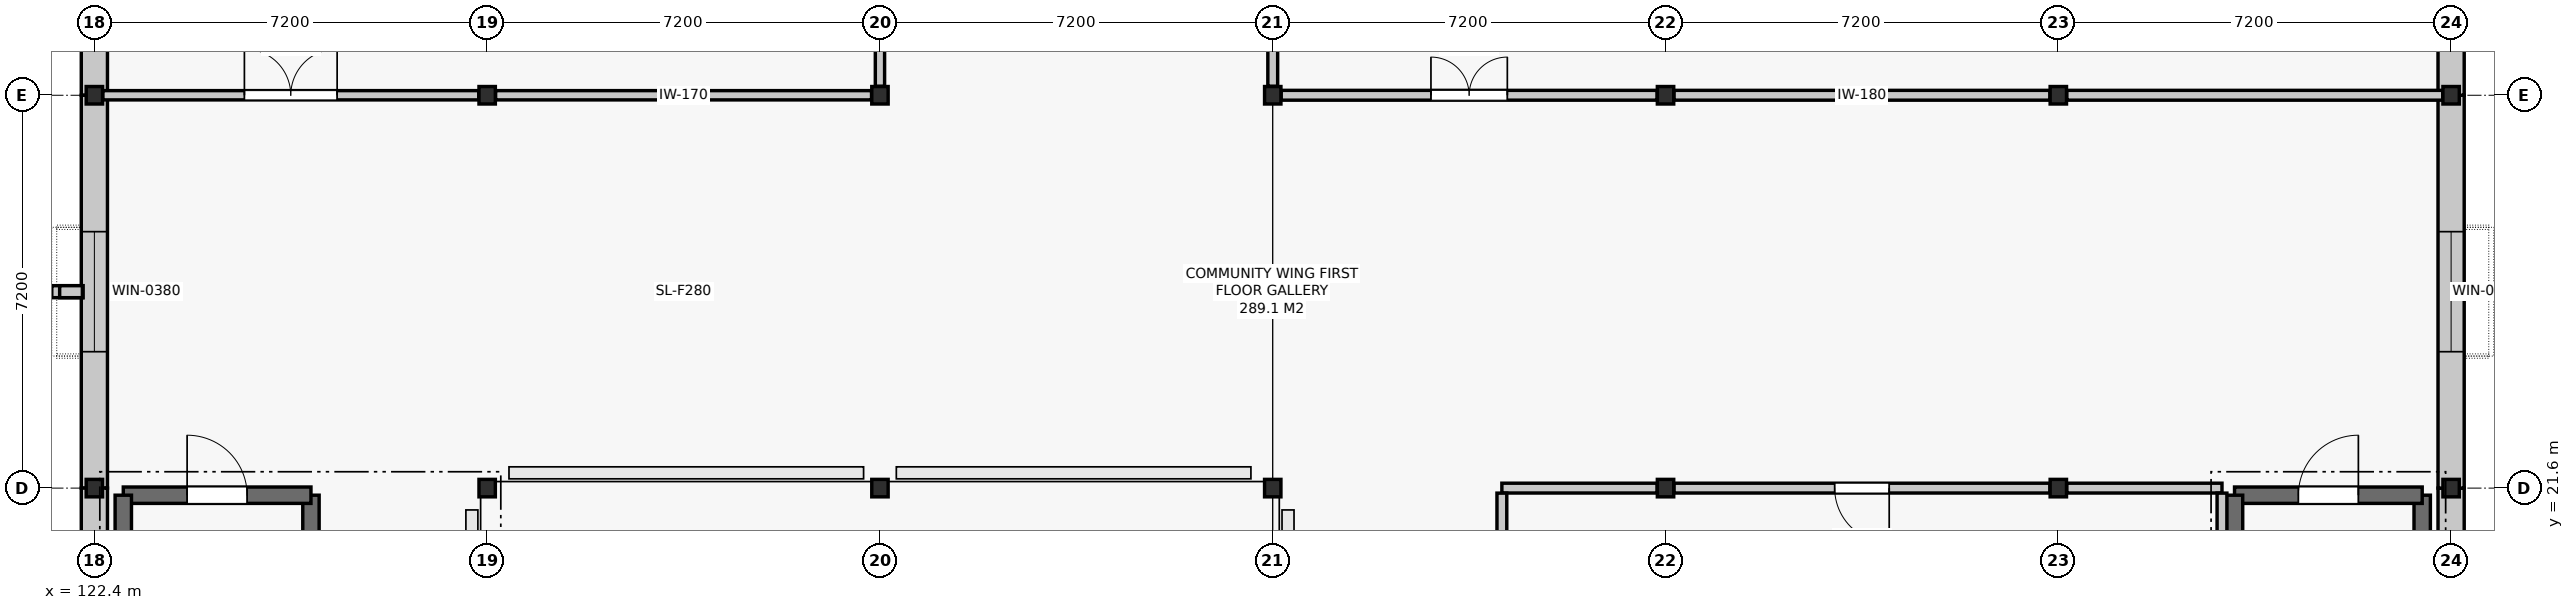
"""IFC4 building model, lengths in metres.
Left out: names, types, materials, properties, quantities, classifications, styles, units other than length and angle.
Written with IfcOpenShell. Run it as: python <this file> out.ifc"""

import sys

from ifc_helpers import new_model, si_unit, direction, frame, frame_2d, origin, origin_2d, place, context, subcontext, project, spatial, rectangle, i_section, extrude, element, fill, save


model = new_model("IFC4")
c1 = context("Model", 3, precision=1e-05, world=origin(), true_north=direction((0.0, 1.0)))
c2 = subcontext(c1, "Body", "Model", "MODEL_VIEW")
j1 = project(units=[si_unit("LENGTHUNIT", "METRE"), si_unit("PLANEANGLEUNIT", "RADIAN")], contexts=[c1])
p1 = place(None, origin())
s1 = spatial("IfcSite", under=j1, at=p1, CompositionType="ELEMENT")
p2 = place(p1, origin())
s2 = spatial("IfcBuilding", under=s1, at=p2, CompositionType="ELEMENT")
p3 = place(p2, frame((0.0, 0.0, 5.4)))
s3 = spatial("IfcBuildingStorey", under=s2, at=p3, CompositionType="ELEMENT", Elevation=5.4)
for number, where, z_axis, x_axis in (
    (1, (122.4, 21.6, 0.0), (0.0, 0.0, 1.0), (1.0, 0.0, 0.0)),
    (2, (122.4, 28.8, 0.0), (0.0, 0.0, 1.0), (1.0, 0.0, 0.0)),
    (3, (129.6, 21.6, 0.0), (0.0, 0.0, 1.0), (1.0, 0.0, 0.0)),
    (4, (129.6, 28.8, 0.0), (0.0, 0.0, 1.0), (1.0, 0.0, 0.0)),
    (5, (136.8, 21.6, 0.0), (0.0, 0.0, 1.0), (1.0, 0.0, 0.0)),
    (6, (136.8, 28.8, 0.0), (0.0, 0.0, 1.0), (1.0, 0.0, 0.0)),
    (7, (144.0, 21.6, 0.0), (0.0, 0.0, 1.0), (1.0, 0.0, 0.0)),
    (8, (144.0, 28.8, 0.0), (0.0, 0.0, 1.0), (1.0, 0.0, 0.0)),
    (9, (151.2, 21.6, 0.0), (0.0, 0.0, 1.0), (1.0, 0.0, 0.0)),
    (10, (151.2, 28.8, 0.0), (0.0, 0.0, 1.0), (1.0, 0.0, 0.0)),
    (11, (158.4, 21.6, 0.0), (0.0, 0.0, 1.0), (1.0, 0.0, 0.0)),
    (12, (158.4, 28.8, 0.0), (0.0, 0.0, 1.0), (1.0, 0.0, 0.0)),
    (13, (165.6, 21.6, 0.0), (0.0, 0.0, 1.0), (1.0, 0.0, 0.0)),
    (14, (165.6, 28.8, 0.0), (0.0, 0.0, 1.0), (1.0, 0.0, 0.0)),
):
    element("IfcColumn", number, at=place(p3, frame(where, z_axis=z_axis, x_axis=x_axis)), inside=s3, PredefinedType="COLUMN", context=c2, shape_type="SweptSolid", body=[
        extrude(i_section(OverallWidth=0.3, OverallDepth=0.32, WebThickness=0.011, FlangeThickness=0.021, FilletRadius=0.027, at=origin_2d()), origin(), (0.0, 0.0, 1.0), 4.8),
    ])
p4 = place(p3, frame((165.6, 14.4, 0.0), z_axis=(0.0, 0.0, 1.0), x_axis=(0.0, 1.0, 0.0)))
e15 = element("IfcWall", 15, at=p4, inside=s3, PredefinedType="SOLIDWALL", context=c2, shape_type="SweptSolid", body=[
    extrude(rectangle(XDim=7.2, YDim=0.48, at=frame_2d((3.6, 0.0))), origin(), (0.0, 0.0, 1.0), 3.8),
])
p5 = place(p3, frame((165.6, 21.6, 0.0), z_axis=(0.0, 0.0, 1.0), x_axis=(0.0, 1.0, 0.0)))
e16 = element("IfcWall", 16, at=p5, inside=s3, PredefinedType="SOLIDWALL", context=c2, shape_type="SweptSolid", body=[
    extrude(rectangle(XDim=7.2, YDim=0.48, at=frame_2d((3.6, 0.0))), origin(), (0.0, 0.0, 1.0), 3.8),
])
p6 = place(p5, frame((2.5, 0.0, 0.9)))
e17 = element("IfcOpeningElement", 17, at=p6, cuts=e16, PredefinedType="OPENING", context=c2, shape_type="SweptSolid", body=[
    extrude(rectangle(XDim=2.2, YDim=2.25, at=frame_2d((1.1, 1.125))), frame((0.0, 0.252, 0.0), z_axis=(0.0, -1.0, 0.0), x_axis=(1.0, 0.0, 0.0)), (0.0, 0.0, 1.0), 0.504),
])
p7 = place(p3, frame((165.6, 28.8, 0.0), z_axis=(0.0, 0.0, 1.0), x_axis=(0.0, 1.0, 0.0)))
e18 = element("IfcWall", 18, at=p7, inside=s3, PredefinedType="SOLIDWALL", context=c2, shape_type="SweptSolid", body=[
    extrude(rectangle(XDim=7.2, YDim=0.48, at=frame_2d((3.6, 0.0))), origin(), (0.0, 0.0, 1.0), 3.8),
])
p8 = place(p7, frame((2.5, 0.0, 0.9)))
e19 = element("IfcOpeningElement", 19, at=p8, cuts=e18, PredefinedType="OPENING", context=c2, shape_type="SweptSolid", body=[
    extrude(rectangle(XDim=2.2, YDim=2.25, at=frame_2d((1.1, 1.125))), frame((0.0, 0.252, 0.0), z_axis=(0.0, -1.0, 0.0), x_axis=(1.0, 0.0, 0.0)), (0.0, 0.0, 1.0), 0.504),
])
p9 = place(p3, frame((122.4, 36.0, 0.0), z_axis=(0.0, 0.0, 1.0), x_axis=(0.0, -1.0, 0.0)))
e20 = element("IfcWall", 20, at=p9, inside=s3, PredefinedType="SOLIDWALL", context=c2, shape_type="SweptSolid", body=[
    extrude(rectangle(XDim=7.2, YDim=0.48, at=frame_2d((3.6, 0.0))), origin(), (0.0, 0.0, 1.0), 3.8),
])
p10 = place(p9, frame((2.5, 0.0, 0.9)))
e21 = element("IfcOpeningElement", 21, at=p10, cuts=e20, PredefinedType="OPENING", context=c2, shape_type="SweptSolid", body=[
    extrude(rectangle(XDim=2.2, YDim=2.25, at=frame_2d((1.1, 1.125))), frame((0.0, 0.252, 0.0), z_axis=(0.0, -1.0, 0.0), x_axis=(1.0, 0.0, 0.0)), (0.0, 0.0, 1.0), 0.504),
])
p11 = place(p3, frame((122.4, 28.8, 0.0), z_axis=(0.0, 0.0, 1.0), x_axis=(0.0, -1.0, 0.0)))
e22 = element("IfcWall", 22, at=p11, inside=s3, PredefinedType="SOLIDWALL", context=c2, shape_type="SweptSolid", body=[
    extrude(rectangle(XDim=7.2, YDim=0.48, at=frame_2d((3.6, 0.0))), origin(), (0.0, 0.0, 1.0), 3.8),
])
p12 = place(p11, frame((2.5, 0.0, 0.9)))
e23 = element("IfcOpeningElement", 23, at=p12, cuts=e22, PredefinedType="OPENING", context=c2, shape_type="SweptSolid", body=[
    extrude(rectangle(XDim=2.2, YDim=2.25, at=frame_2d((1.1, 1.125))), frame((0.0, 0.252, 0.0), z_axis=(0.0, -1.0, 0.0), x_axis=(1.0, 0.0, 0.0)), (0.0, 0.0, 1.0), 0.504),
])
p13 = place(p3, frame((122.4, 21.6, 0.0), z_axis=(0.0, 0.0, 1.0), x_axis=(0.0, -1.0, 0.0)))
e24 = element("IfcWall", 24, at=p13, inside=s3, PredefinedType="SOLIDWALL", context=c2, shape_type="SweptSolid", body=[
    extrude(rectangle(XDim=7.2, YDim=0.48, at=frame_2d((3.6, 0.0))), origin(), (0.0, 0.0, 1.0), 3.8),
])
p14 = place(p13, frame((2.5, 0.0, 0.9)))
e25 = element("IfcOpeningElement", 25, at=p14, cuts=e24, PredefinedType="OPENING", context=c2, shape_type="SweptSolid", body=[
    extrude(rectangle(XDim=2.2, YDim=2.25, at=frame_2d((1.1, 1.125))), frame((0.0, 0.252, 0.0), z_axis=(0.0, -1.0, 0.0), x_axis=(1.0, 0.0, 0.0)), (0.0, 0.0, 1.0), 0.504),
])
p15 = place(p3, frame((126.37, 14.43, 0.0), z_axis=(0.0, 0.0, 1.0), x_axis=(0.0, 1.0, 0.0)))
e26 = element("IfcWall", 26, at=p15, inside=s3, PredefinedType="SHEAR", context=c2, shape_type="SweptSolid", body=[
    extrude(rectangle(XDim=7.04, YDim=0.3, at=frame_2d((3.52, 0.0))), origin(), (0.0, 0.0, 1.0), 4.52),
])
p16 = place(p3, frame((126.37, 21.47, 0.0), z_axis=(0.0, 0.0, 1.0), x_axis=(-1.0, 0.0, 0.0)))
e27 = element("IfcWall", 27, at=p16, inside=s3, PredefinedType="SHEAR", context=c2, shape_type="SweptSolid", body=[
    extrude(rectangle(XDim=3.44, YDim=0.3, at=frame_2d((1.72, 0.0))), origin(), (0.0, 0.0, 1.0), 4.52),
])
p17 = place(p16, frame((1.17, 0.0, 0.0)))
e28 = element("IfcOpeningElement", 28, at=p17, cuts=e27, PredefinedType="OPENING", context=c2, shape_type="SweptSolid", body=[
    extrude(rectangle(XDim=1.1, YDim=2.15, at=frame_2d((0.55, 1.075))), frame((0.0, 0.162, 0.0), z_axis=(0.0, -1.0, 0.0), x_axis=(1.0, 0.0, 0.0)), (0.0, 0.0, 1.0), 0.324),
])
for number, where, z_axis, x_axis in (
    (29, (122.93, 21.47, 0.0), (0.0, 0.0, 1.0), (0.0, -1.0, 0.0)),
    (30, (165.07, 14.43, 0.0), (0.0, 0.0, 1.0), (0.0, 1.0, 0.0)),
):
    element("IfcWall", number, at=place(p3, frame(where, z_axis=z_axis, x_axis=x_axis)), inside=s3, PredefinedType="SHEAR", context=c2, shape_type="SweptSolid", body=[
        extrude(rectangle(XDim=7.04, YDim=0.3, at=frame_2d((3.52, 0.0))), origin(), (0.0, 0.0, 1.0), 4.52),
    ])
p18 = place(p3, frame((165.07, 21.47, 0.0), z_axis=(0.0, 0.0, 1.0), x_axis=(-1.0, 0.0, 0.0)))
e31 = element("IfcWall", 31, at=p18, inside=s3, PredefinedType="SHEAR", context=c2, shape_type="SweptSolid", body=[
    extrude(rectangle(XDim=3.44, YDim=0.3, at=frame_2d((1.72, 0.0))), origin(), (0.0, 0.0, 1.0), 4.52),
])
p19 = place(p18, frame((1.17, 0.0, 0.0)))
e32 = element("IfcOpeningElement", 32, at=p19, cuts=e31, PredefinedType="OPENING", context=c2, shape_type="SweptSolid", body=[
    extrude(rectangle(XDim=1.1, YDim=2.15, at=frame_2d((0.55, 1.075))), frame((0.0, 0.162, 0.0), z_axis=(0.0, -1.0, 0.0), x_axis=(1.0, 0.0, 0.0)), (0.0, 0.0, 1.0), 0.324),
])
p20 = place(p3, frame((161.63, 21.47, 0.0), z_axis=(0.0, 0.0, 1.0), x_axis=(0.0, -1.0, 0.0)))
e33 = element("IfcWall", 33, at=p20, inside=s3, PredefinedType="SHEAR", context=c2, shape_type="SweptSolid", body=[
    extrude(rectangle(XDim=7.04, YDim=0.3, at=frame_2d((3.52, 0.0))), origin(), (0.0, 0.0, 1.0), 4.52),
])
p21 = place(p3, frame((144.154, 28.8, 0.0), z_axis=(0.0, 0.0, 1.0), x_axis=(1.0, 0.0, 0.0)))
e34 = element("IfcWall", 34, at=p21, inside=s3, PredefinedType="PARTITIONING", context=c2, shape_type="SweptSolid", body=[
    extrude(rectangle(XDim=6.892, YDim=0.18, at=frame_2d((3.446, 0.0))), origin(), (0.0, 0.0, 1.0), 4.055),
])
p22 = place(p21, frame((2.746, 0.0, 0.0)))
e35 = element("IfcOpeningElement", 35, at=p22, cuts=e34, PredefinedType="OPENING", context=c2, shape_type="SweptSolid", body=[
    extrude(rectangle(XDim=1.4, YDim=2.2, at=frame_2d((0.7, 1.1))), frame((0.0, 0.102, 0.0), z_axis=(0.0, -1.0, 0.0), x_axis=(1.0, 0.0, 0.0)), (0.0, 0.0, 1.0), 0.204),
])
for number, where, z_axis, x_axis in (
    (36, (151.354, 28.8, 0.0), (0.0, 0.0, 1.0), (1.0, 0.0, 0.0)),
    (37, (158.554, 28.8, 0.0), (0.0, 0.0, 1.0), (1.0, 0.0, 0.0)),
):
    element("IfcWall", number, at=place(p3, frame(where, z_axis=z_axis, x_axis=x_axis)), inside=s3, PredefinedType="PARTITIONING", context=c2, shape_type="SweptSolid", body=[
        extrude(rectangle(XDim=6.892, YDim=0.18, at=frame_2d((3.446, 0.0))), origin(), (0.0, 0.0, 1.0), 4.055),
    ])
p23 = place(p3, frame((122.554, 28.8, 0.0), z_axis=(0.0, 0.0, 1.0), x_axis=(1.0, 0.0, 0.0)))
e38 = element("IfcWall", 38, at=p23, inside=s3, PredefinedType="PARTITIONING", context=c2, shape_type="SweptSolid", body=[
    extrude(rectangle(XDim=6.892, YDim=0.17, at=frame_2d((3.446, 0.0))), origin(), (0.0, 0.0, 1.0), 4.055),
])
p24 = place(p23, frame((2.596, 0.0, 0.0)))
e39 = element("IfcOpeningElement", 39, at=p24, cuts=e38, PredefinedType="OPENING", context=c2, shape_type="SweptSolid", body=[
    extrude(rectangle(XDim=1.7, YDim=2.3, at=frame_2d((0.85, 1.15))), frame((0.0, 0.097, 0.0), z_axis=(0.0, -1.0, 0.0), x_axis=(1.0, 0.0, 0.0)), (0.0, 0.0, 1.0), 0.194),
])
p25 = place(p3, frame((129.754, 28.8, 0.0), z_axis=(0.0, 0.0, 1.0), x_axis=(1.0, 0.0, 0.0)))
e40 = element("IfcWall", 40, at=p25, inside=s3, PredefinedType="PARTITIONING", context=c2, shape_type="SweptSolid", body=[
    extrude(rectangle(XDim=6.892, YDim=0.17, at=frame_2d((3.446, 0.0))), origin(), (0.0, 0.0, 1.0), 4.055),
])
p26 = place(p3, frame((148.2, 21.6, 0.0), z_axis=(0.0, 0.0, 1.0), x_axis=(1.0, 0.0, 0.0)))
e41 = element("IfcWall", 41, at=p26, inside=s3, PredefinedType="PARTITIONING", context=c2, shape_type="SweptSolid", body=[
    extrude(rectangle(XDim=2.846, YDim=0.18, at=frame_2d((1.423, 0.0))), origin(), (0.0, 0.0, 1.0), 4.115),
])
p27 = place(p3, frame((151.354, 21.6, 0.0), z_axis=(0.0, 0.0, 1.0), x_axis=(1.0, 0.0, 0.0)))
e42 = element("IfcWall", 42, at=p27, inside=s3, PredefinedType="PARTITIONING", context=c2, shape_type="SweptSolid", body=[
    extrude(rectangle(XDim=6.892, YDim=0.18, at=frame_2d((3.446, 0.0))), origin(), (0.0, 0.0, 1.0), 4.115),
])
p28 = place(p27, frame((2.946, 0.0, 0.0)))
e43 = element("IfcOpeningElement", 43, at=p28, cuts=e42, PredefinedType="OPENING", context=c2, shape_type="SweptSolid", body=[
    extrude(rectangle(XDim=1.0, YDim=2.15, at=frame_2d((0.5, 1.075))), frame((0.0, 0.102, 0.0), z_axis=(0.0, -1.0, 0.0), x_axis=(1.0, 0.0, 0.0)), (0.0, 0.0, 1.0), 0.204),
])
p29 = place(p3, frame((158.554, 21.6, 0.0), z_axis=(0.0, 0.0, 1.0), x_axis=(1.0, 0.0, 0.0)))
e44 = element("IfcWall", 44, at=p29, inside=s3, PredefinedType="PARTITIONING", context=c2, shape_type="SweptSolid", body=[
    extrude(rectangle(XDim=2.846, YDim=0.18, at=frame_2d((1.423, 0.0))), origin(), (0.0, 0.0, 1.0), 4.115),
])
p30 = place(p3, frame((144.0, 28.964, 0.0), z_axis=(0.0, 0.0, 1.0), x_axis=(0.0, 1.0, 0.0)))
e45 = element("IfcWall", 45, at=p30, inside=s3, PredefinedType="PARTITIONING", context=c2, shape_type="SweptSolid", body=[
    extrude(rectangle(XDim=6.872, YDim=0.18, at=frame_2d((3.436, 0.0))), origin(), (0.0, 0.0, 1.0), 4.005),
])
p31 = place(p30, frame((2.736, 0.0, 0.0)))
e46 = element("IfcOpeningElement", 46, at=p31, cuts=e45, PredefinedType="OPENING", context=c2, shape_type="SweptSolid", body=[
    extrude(rectangle(XDim=1.4, YDim=2.2, at=frame_2d((0.7, 1.1))), frame((0.0, 0.102, 0.0), z_axis=(0.0, -1.0, 0.0), x_axis=(1.0, 0.0, 0.0)), (0.0, 0.0, 1.0), 0.204),
])
p32 = place(p3, frame((136.8, 28.964, 0.0), z_axis=(0.0, 0.0, 1.0), x_axis=(0.0, 1.0, 0.0)))
e47 = element("IfcWall", 47, at=p32, inside=s3, PredefinedType="PARTITIONING", context=c2, shape_type="SweptSolid", body=[
    extrude(rectangle(XDim=6.872, YDim=0.17, at=frame_2d((3.436, 0.0))), origin(), (0.0, 0.0, 1.0), 4.005),
])
p33 = place(p32, frame((2.586, 0.0, 0.0)))
e48 = element("IfcOpeningElement", 48, at=p33, cuts=e47, PredefinedType="OPENING", context=c2, shape_type="SweptSolid", body=[
    extrude(rectangle(XDim=1.7, YDim=2.3, at=frame_2d((0.85, 1.15))), frame((0.0, 0.097, 0.0), z_axis=(0.0, -1.0, 0.0), x_axis=(1.0, 0.0, 0.0)), (0.0, 0.0, 1.0), 0.194),
])
p34 = place(p3, frame((148.2, 18.077, 0.0), z_axis=(0.0, 0.0, 1.0), x_axis=(0.0, 1.0, 0.0)))
e49 = element("IfcWall", 49, at=p34, inside=s3, PredefinedType="PARTITIONING", context=c2, shape_type="SweptSolid", body=[
    extrude(rectangle(XDim=3.431, YDim=0.18, at=frame_2d((1.716, 0.0))), origin(), (0.0, 0.0, 1.0), 4.115),
])
p35 = place(p3, frame((161.4, 18.092, 0.0), z_axis=(0.0, 0.0, 1.0), x_axis=(0.0, 1.0, 0.0)))
e50 = element("IfcWall", 50, at=p35, inside=s3, PredefinedType="PARTITIONING", context=c2, shape_type="SweptSolid", body=[
    extrude(rectangle(XDim=3.416, YDim=0.18, at=frame_2d((1.708, 0.0))), origin(), (0.0, 0.0, 1.0), 4.115),
])
p36 = place(p6, origin())
e51 = element("IfcWindow", 51, at=p36, inside=s3, PartitioningType="SINGLE_PANEL", PredefinedType="WINDOW", context=c2, shape_type="SweptSolid", body=[
    extrude(rectangle(XDim=2.2, YDim=2.25, at=frame_2d((1.1, 1.125))), frame((0.0, 0.03, 0.0), z_axis=(0.0, -1.0, 0.0), x_axis=(1.0, 0.0, 0.0)), (0.0, 0.0, 1.0), 0.06),
])
fill(e17, e51)
p37 = place(p12, origin())
e52 = element("IfcWindow", 52, at=p37, inside=s3, PartitioningType="SINGLE_PANEL", PredefinedType="WINDOW", context=c2, shape_type="SweptSolid", body=[
    extrude(rectangle(XDim=2.2, YDim=2.25, at=frame_2d((1.1, 1.125))), frame((0.0, 0.03, 0.0), z_axis=(0.0, -1.0, 0.0), x_axis=(1.0, 0.0, 0.0)), (0.0, 0.0, 1.0), 0.06),
])
fill(e23, e52)
p38 = place(p17, frame((1.1, 0.0, 0.0), z_axis=(0.0, 0.0, 1.0), x_axis=(-1.0, 0.0, 0.0)))
e53 = element("IfcDoor", 53, at=p38, inside=s3, OperationType="SINGLE_SWING_LEFT", PredefinedType="DOOR", context=c2, shape_type="SweptSolid", body=[
    extrude(rectangle(XDim=1.1, YDim=2.15, at=frame_2d((0.55, 1.075))), frame((0.0, 0.025, 0.0), z_axis=(0.0, -1.0, 0.0), x_axis=(1.0, 0.0, 0.0)), (0.0, 0.0, 1.0), 0.05),
])
fill(e28, e53)
p39 = place(p19, frame((1.1, 0.0, 0.0), z_axis=(0.0, 0.0, 1.0), x_axis=(-1.0, 0.0, 0.0)))
e54 = element("IfcDoor", 54, at=p39, inside=s3, OperationType="SINGLE_SWING_RIGHT", PredefinedType="DOOR", context=c2, shape_type="SweptSolid", body=[
    extrude(rectangle(XDim=1.1, YDim=2.15, at=frame_2d((0.55, 1.075))), frame((0.0, 0.025, 0.0), z_axis=(0.0, -1.0, 0.0), x_axis=(1.0, 0.0, 0.0)), (0.0, 0.0, 1.0), 0.05),
])
fill(e32, e54)
p40 = place(p22, origin())
e55 = element("IfcDoor", 55, at=p40, inside=s3, OperationType="DOUBLE_DOOR_SINGLE_SWING", PredefinedType="DOOR", context=c2, shape_type="SweptSolid", body=[
    extrude(rectangle(XDim=1.4, YDim=2.2, at=frame_2d((0.7, 1.1))), frame((0.0, 0.025, 0.0), z_axis=(0.0, -1.0, 0.0), x_axis=(1.0, 0.0, 0.0)), (0.0, 0.0, 1.0), 0.05),
])
fill(e35, e55)
p41 = place(p24, origin())
e56 = element("IfcDoor", 56, at=p41, inside=s3, OperationType="DOUBLE_DOOR_SINGLE_SWING", PredefinedType="DOOR", context=c2, shape_type="SweptSolid", body=[
    extrude(rectangle(XDim=1.7, YDim=2.3, at=frame_2d((0.85, 1.15))), frame((0.0, 0.025, 0.0), z_axis=(0.0, -1.0, 0.0), x_axis=(1.0, 0.0, 0.0)), (0.0, 0.0, 1.0), 0.05),
])
fill(e39, e56)
p42 = place(p28, frame((1.0, 0.0, 0.0), z_axis=(0.0, 0.0, 1.0), x_axis=(-1.0, 0.0, 0.0)))
e57 = element("IfcDoor", 57, at=p42, inside=s3, OperationType="SINGLE_SWING_LEFT", PredefinedType="DOOR", context=c2, shape_type="SweptSolid", body=[
    extrude(rectangle(XDim=1.0, YDim=2.15, at=frame_2d((0.5, 1.075))), frame((0.0, 0.025, 0.0), z_axis=(0.0, -1.0, 0.0), x_axis=(1.0, 0.0, 0.0)), (0.0, 0.0, 1.0), 0.05),
])
fill(e43, e57)
save(model, sys.argv[1])
